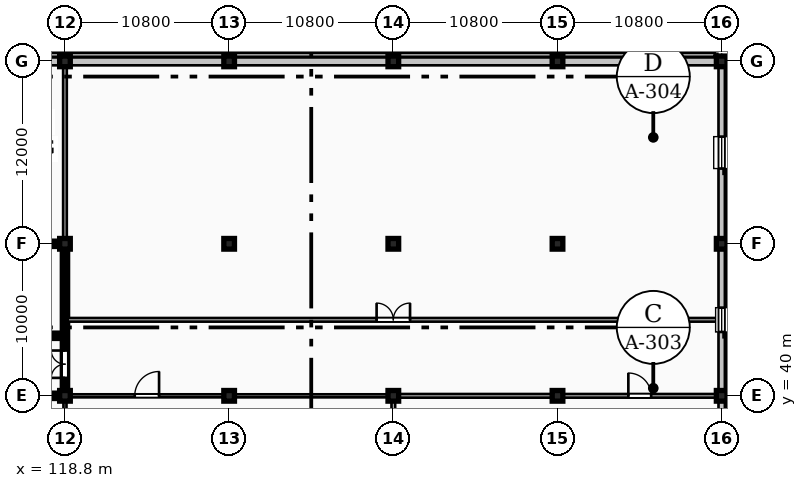
"""IFC4 building model, lengths in metres.
Left out: names, types, materials, properties, quantities, classifications, styles, units other than length and angle.
Written with IfcOpenShell. Run it as: python <this file> out.ifc"""

import sys

from ifc_helpers import new_model, si_unit, direction, frame, frame_2d, origin, origin_2d, place, context, subcontext, project, spatial, rectangle, extrude, element, fill, save


model = new_model("IFC4")
c1 = context("Model", 3, precision=1e-05, world=origin(), true_north=direction((0.0, 1.0)))
c2 = subcontext(c1, "Body", "Model", "MODEL_VIEW")
j1 = project(units=[si_unit("LENGTHUNIT", "METRE"), si_unit("PLANEANGLEUNIT", "RADIAN")], contexts=[c1])
p1 = place(None, origin())
s1 = spatial("IfcSite", under=j1, at=p1, CompositionType="ELEMENT")
p2 = place(p1, origin())
s2 = spatial("IfcBuilding", under=s1, at=p2, CompositionType="ELEMENT")
p3 = place(p2, origin())
s3 = spatial("IfcBuildingStorey", under=s2, at=p3, CompositionType="ELEMENT", Elevation=0.0)
for number, where, z_axis, x_axis in (
    (1, (118.8, 40.0, 0.0), (0.0, 0.0, 1.0), (1.0, 0.0, 0.0)),
    (2, (118.8, 50.0, 0.0), (0.0, 0.0, 1.0), (1.0, 0.0, 0.0)),
    (3, (118.8, 62.0, 0.0), (0.0, 0.0, 1.0), (1.0, 0.0, 0.0)),
    (4, (129.6, 40.0, 0.0), (0.0, 0.0, 1.0), (1.0, 0.0, 0.0)),
    (5, (129.6, 50.0, 0.0), (0.0, 0.0, 1.0), (1.0, 0.0, 0.0)),
    (6, (129.6, 62.0, 0.0), (0.0, 0.0, 1.0), (1.0, 0.0, 0.0)),
    (7, (140.4, 40.0, 0.0), (0.0, 0.0, 1.0), (1.0, 0.0, 0.0)),
    (8, (140.4, 50.0, 0.0), (0.0, 0.0, 1.0), (1.0, 0.0, 0.0)),
    (9, (140.4, 62.0, 0.0), (0.0, 0.0, 1.0), (1.0, 0.0, 0.0)),
    (10, (151.2, 40.0, 0.0), (0.0, 0.0, 1.0), (1.0, 0.0, 0.0)),
    (11, (151.2, 50.0, 0.0), (0.0, 0.0, 1.0), (1.0, 0.0, 0.0)),
    (12, (151.2, 62.0, 0.0), (0.0, 0.0, 1.0), (1.0, 0.0, 0.0)),
    (13, (162.0, 40.0, 0.0), (0.0, 0.0, 1.0), (1.0, 0.0, 0.0)),
    (14, (162.0, 50.0, 0.0), (0.0, 0.0, 1.0), (1.0, 0.0, 0.0)),
    (15, (162.0, 62.0, 0.0), (0.0, 0.0, 1.0), (1.0, 0.0, 0.0)),
):
    element("IfcColumn", number, at=place(p3, frame(where, z_axis=z_axis, x_axis=x_axis)), inside=s3, PredefinedType="COLUMN", context=c2, shape_type="SweptSolid", body=[
        extrude(rectangle(XDim=0.7, YDim=0.7, at=origin_2d()), origin(), (0.0, 0.0, 1.0), 4.8),
    ])
p4 = place(p3, frame((162.43, 38.2, -1.38), z_axis=(0.0, 0.0, 1.0), x_axis=(0.0, 1.0, 0.0)))
e16 = element("IfcWall", 16, at=p4, inside=s3, PredefinedType="PARAPET", context=c2, shape_type="SweptSolid", body=[
    extrude(rectangle(XDim=23.35, YDim=0.26, at=frame_2d((11.675, 0.0))), origin(), (0.0, 0.0, 1.0), 4.18),
])
p5 = place(p3, frame((108.35, 62.43, -1.38), z_axis=(0.0, 0.0, 1.0), x_axis=(1.0, 0.0, 0.0)))
e17 = element("IfcWall", 17, at=p5, inside=s3, PredefinedType="PARAPET", context=c2, shape_type="SweptSolid", body=[
    extrude(rectangle(XDim=53.2, YDim=0.26, at=frame_2d((26.6, 0.0))), origin(), (0.0, 0.0, 1.0), 4.58),
])
p6 = place(p3, frame((162.0, 30.145, 0.0), z_axis=(0.0, 0.0, 1.0), x_axis=(0.0, 1.0, 0.0)))
e18 = element("IfcWall", 18, at=p6, inside=s3, PredefinedType="STANDARD", context=c2, shape_type="SweptSolid", body=[
    extrude(rectangle(XDim=9.71, YDim=0.42, at=frame_2d((4.855, 0.0))), origin(), (0.0, 0.0, 1.0), 4.13),
])
p7 = place(p6, frame((4.055, 0.0, 1.2)))
e19 = element("IfcOpeningElement", 19, at=p7, cuts=e18, PredefinedType="OPENING", context=c2, shape_type="SweptSolid", body=[
    extrude(rectangle(XDim=1.6, YDim=1.8, at=frame_2d((0.8, 0.9))), frame((0.0, 0.22, 0.0), z_axis=(0.0, -1.0, 0.0), x_axis=(1.0, 0.0, 0.0)), (0.0, 0.0, 1.0), 0.44),
])
p8 = place(p3, frame((162.0, 40.145, 0.0), z_axis=(0.0, 0.0, 1.0), x_axis=(0.0, 1.0, 0.0)))
e20 = element("IfcWall", 20, at=p8, inside=s3, PredefinedType="STANDARD", context=c2, shape_type="SweptSolid", body=[
    extrude(rectangle(XDim=9.71, YDim=0.42, at=frame_2d((4.855, 0.0))), origin(), (0.0, 0.0, 1.0), 4.13),
])
p9 = place(p8, frame((4.055, 0.0, 1.2)))
e21 = element("IfcOpeningElement", 21, at=p9, cuts=e20, PredefinedType="OPENING", context=c2, shape_type="SweptSolid", body=[
    extrude(rectangle(XDim=1.6, YDim=1.8, at=frame_2d((0.8, 0.9))), frame((0.0, 0.22, 0.0), z_axis=(0.0, -1.0, 0.0), x_axis=(1.0, 0.0, 0.0)), (0.0, 0.0, 1.0), 0.44),
])
p10 = place(p3, frame((162.0, 50.145, 0.0), z_axis=(0.0, 0.0, 1.0), x_axis=(0.0, 1.0, 0.0)))
e22 = element("IfcWall", 22, at=p10, inside=s3, PredefinedType="STANDARD", context=c2, shape_type="SweptSolid", body=[
    extrude(rectangle(XDim=11.71, YDim=0.42, at=frame_2d((5.855, 0.0))), origin(), (0.0, 0.0, 1.0), 4.13),
])
p11 = place(p10, frame((4.805, 0.0, 1.2)))
e23 = element("IfcOpeningElement", 23, at=p11, cuts=e22, PredefinedType="OPENING", context=c2, shape_type="SweptSolid", body=[
    extrude(rectangle(XDim=2.1, YDim=1.6, at=frame_2d((1.05, 0.8))), frame((0.0, 0.22, 0.0), z_axis=(0.0, -1.0, 0.0), x_axis=(1.0, 0.0, 0.0)), (0.0, 0.0, 1.0), 0.44),
])
p12 = place(p3, frame((161.855, 62.0, 0.0), z_axis=(0.0, 0.0, 1.0), x_axis=(-1.0, 0.0, 0.0)))
e24 = element("IfcWall", 24, at=p12, inside=s3, PredefinedType="SOLIDWALL", context=c2, shape_type="SweptSolid", body=[
    extrude(rectangle(XDim=10.51, YDim=0.52, at=frame_2d((5.255, 0.0))), origin(), (0.0, 0.0, 1.0), 4.13),
])
p13 = place(p3, frame((151.055, 62.0, 0.0), z_axis=(0.0, 0.0, 1.0), x_axis=(-1.0, 0.0, 0.0)))
e25 = element("IfcWall", 25, at=p13, inside=s3, PredefinedType="SOLIDWALL", context=c2, shape_type="SweptSolid", body=[
    extrude(rectangle(XDim=10.51, YDim=0.52, at=frame_2d((5.255, 0.0))), origin(), (0.0, 0.0, 1.0), 3.819),
])
p14 = place(p3, frame((140.255, 62.0, 0.0), z_axis=(0.0, 0.0, 1.0), x_axis=(-1.0, 0.0, 0.0)))
e26 = element("IfcWall", 26, at=p14, inside=s3, PredefinedType="SOLIDWALL", context=c2, shape_type="SweptSolid", body=[
    extrude(rectangle(XDim=10.51, YDim=0.52, at=frame_2d((5.255, 0.0))), origin(), (0.0, 0.0, 1.0), 3.819),
])
for number, where, z_axis, x_axis in (
    (27, (129.455, 62.0, 0.0), (0.0, 0.0, 1.0), (-1.0, 0.0, 0.0)),
    (28, (118.655, 62.0, 0.0), (0.0, 0.0, 1.0), (-1.0, 0.0, 0.0)),
):
    element("IfcWall", number, at=place(p3, frame(where, z_axis=z_axis, x_axis=x_axis)), inside=s3, PredefinedType="SOLIDWALL", context=c2, shape_type="SweptSolid", body=[
        extrude(rectangle(XDim=10.51, YDim=0.52, at=frame_2d((5.255, 0.0))), origin(), (0.0, 0.0, 1.0), 3.819),
    ])
p15 = place(p3, frame((108.35, 40.0, 0.0), z_axis=(0.0, 0.0, 1.0), x_axis=(1.0, 0.0, 0.0)))
e29 = element("IfcWall", 29, at=p15, inside=s3, PredefinedType="SHEAR", context=c2, shape_type="SweptSolid", body=[
    extrude(rectangle(XDim=10.1, YDim=0.35, at=frame_2d((5.05, 0.0))), origin(), (0.0, 0.0, 1.0), 4.56),
])
p16 = place(p3, frame((108.35, 50.0, 0.0), z_axis=(0.0, 0.0, 1.0), x_axis=(1.0, 0.0, 0.0)))
e30 = element("IfcWall", 30, at=p16, inside=s3, PredefinedType="SHEAR", context=c2, shape_type="SweptSolid", body=[
    extrude(rectangle(XDim=10.1, YDim=0.35, at=frame_2d((5.05, 0.0))), origin(), (0.0, 0.0, 1.0), 4.56),
])
p17 = place(p16, frame((1.3, 0.0, 0.0)))
e31 = element("IfcOpeningElement", 31, at=p17, cuts=e30, PredefinedType="OPENING", context=c2, shape_type="SweptSolid", body=[
    extrude(rectangle(XDim=1.6, YDim=2.2, at=frame_2d((0.8, 1.1))), frame((0.0, 0.185, 0.0), z_axis=(0.0, -1.0, 0.0), x_axis=(1.0, 0.0, 0.0)), (0.0, 0.0, 1.0), 0.37),
])
p18 = place(p3, frame((118.8, 40.35, 0.0), z_axis=(0.0, 0.0, 1.0), x_axis=(0.0, 1.0, 0.0)))
e32 = element("IfcWall", 32, at=p18, inside=s3, PredefinedType="SHEAR", context=c2, shape_type="SweptSolid", body=[
    extrude(rectangle(XDim=9.3, YDim=0.35, at=frame_2d((4.65, 0.0))), origin(), (0.0, 0.0, 1.0), 4.56),
])
p19 = place(p18, frame((0.83, 0.0, 0.0)))
e33 = element("IfcOpeningElement", 33, at=p19, cuts=e32, PredefinedType="OPENING", context=c2, shape_type="SweptSolid", body=[
    extrude(rectangle(XDim=1.8, YDim=2.25, at=frame_2d((0.9, 1.125))), frame((0.0, 0.185, 0.0), z_axis=(0.0, -1.0, 0.0), x_axis=(1.0, 0.0, 0.0)), (0.0, 0.0, 1.0), 0.37),
])
p20 = place(p3, frame((113.13, 43.95, 0.0), z_axis=(0.0, 0.0, 1.0), x_axis=(1.0, 0.0, 0.0)))
e34 = element("IfcWall", 34, at=p20, inside=s3, PredefinedType="SHEAR", context=c2, shape_type="SweptSolid", body=[
    extrude(rectangle(XDim=5.49, YDim=0.35, at=frame_2d((2.745, 0.0))), origin(), (0.0, 0.0, 1.0), 4.56),
])
p21 = place(p20, frame((2.1, 0.0, 0.0)))
e35 = element("IfcOpeningElement", 35, at=p21, cuts=e34, PredefinedType="OPENING", context=c2, shape_type="SweptSolid", body=[
    extrude(rectangle(XDim=1.1, YDim=2.2, at=frame_2d((0.55, 1.1))), frame((0.0, 0.185, 0.0), z_axis=(0.0, -1.0, 0.0), x_axis=(1.0, 0.0, 0.0)), (0.0, 0.0, 1.0), 0.37),
])
p22 = place(p3, frame((118.98, 40.0, 0.0), z_axis=(0.0, 0.0, 1.0), x_axis=(1.0, 0.0, 0.0)))
e36 = element("IfcWall", 36, at=p22, inside=s3, PredefinedType="SOLIDWALL", context=c2, shape_type="SweptSolid", body=[
    extrude(rectangle(XDim=10.42, YDim=0.2, at=frame_2d((5.21, 0.0))), origin(), (0.0, 0.0, 1.0), 3.819),
])
p23 = place(p22, frame((4.41, 0.0, 0.0)))
e37 = element("IfcOpeningElement", 37, at=p23, cuts=e36, PredefinedType="OPENING", context=c2, shape_type="SweptSolid", body=[
    extrude(rectangle(XDim=1.6, YDim=2.3, at=frame_2d((0.8, 1.15))), frame((0.0, 0.11, 0.0), z_axis=(0.0, -1.0, 0.0), x_axis=(1.0, 0.0, 0.0)), (0.0, 0.0, 1.0), 0.22),
])
p24 = place(p3, frame((129.8, 40.0, 0.0), z_axis=(0.0, 0.0, 1.0), x_axis=(1.0, 0.0, 0.0)))
e38 = element("IfcWall", 38, at=p24, inside=s3, PredefinedType="SOLIDWALL", context=c2, shape_type="SweptSolid", body=[
    extrude(rectangle(XDim=10.4, YDim=0.2, at=frame_2d((5.2, 0.0))), origin(), (0.0, 0.0, 1.0), 3.819),
])
p25 = place(p3, frame((140.6, 40.0, 0.0), z_axis=(0.0, 0.0, 1.0), x_axis=(1.0, 0.0, 0.0)))
e39 = element("IfcWall", 39, at=p25, inside=s3, PredefinedType="SOLIDWALL", context=c2, shape_type="SweptSolid", body=[
    extrude(rectangle(XDim=10.4, YDim=0.24, at=frame_2d((5.2, 0.0))), origin(), (0.0, 0.0, 1.0), 3.819),
])
p26 = place(p3, frame((151.4, 40.0, 0.0), z_axis=(0.0, 0.0, 1.0), x_axis=(1.0, 0.0, 0.0)))
e40 = element("IfcWall", 40, at=p26, inside=s3, PredefinedType="SOLIDWALL", context=c2, shape_type="SweptSolid", body=[
    extrude(rectangle(XDim=10.42, YDim=0.24, at=frame_2d((5.21, 0.0))), origin(), (0.0, 0.0, 1.0), 4.13),
])
p27 = place(p26, frame((4.46, 0.0, 0.0)))
e41 = element("IfcOpeningElement", 41, at=p27, cuts=e40, PredefinedType="OPENING", context=c2, shape_type="SweptSolid", body=[
    extrude(rectangle(XDim=1.5, YDim=2.3, at=frame_2d((0.75, 1.15))), frame((0.0, 0.13, 0.0), z_axis=(0.0, -1.0, 0.0), x_axis=(1.0, 0.0, 0.0)), (0.0, 0.0, 1.0), 0.26),
])
p28 = place(p3, frame((118.98, 45.0, 0.0), z_axis=(0.0, 0.0, 1.0), x_axis=(1.0, 0.0, 0.0)))
e42 = element("IfcWall", 42, at=p28, inside=s3, PredefinedType="SOLIDWALL", context=c2, shape_type="SweptSolid", body=[
    extrude(rectangle(XDim=42.84, YDim=0.24, at=frame_2d((21.42, 0.0))), origin(), (0.0, 0.0, 1.0), 4.52),
])
p29 = place(p28, frame((20.32, 0.0, 0.0)))
e43 = element("IfcOpeningElement", 43, at=p29, cuts=e42, PredefinedType="OPENING", context=c2, shape_type="SweptSolid", body=[
    extrude(rectangle(XDim=2.2, YDim=2.6, at=frame_2d((1.1, 1.3))), frame((0.0, 0.13, 0.0), z_axis=(0.0, -1.0, 0.0), x_axis=(1.0, 0.0, 0.0)), (0.0, 0.0, 1.0), 0.26),
])
p30 = place(p3, frame((118.8, 30.2, 0.0), z_axis=(0.0, 0.0, 1.0), x_axis=(0.0, 1.0, 0.0)))
e44 = element("IfcWall", 44, at=p30, inside=s3, PredefinedType="SOLIDWALL", context=c2, shape_type="SweptSolid", body=[
    extrude(rectangle(XDim=9.62, YDim=0.2, at=frame_2d((4.81, 0.0))), origin(), (0.0, 0.0, 1.0), 3.97),
])
p31 = place(p3, frame((118.8, 50.18, 0.0), z_axis=(0.0, 0.0, 1.0), x_axis=(0.0, 1.0, 0.0)))
e45 = element("IfcWall", 45, at=p31, inside=s3, PredefinedType="SOLIDWALL", context=c2, shape_type="SweptSolid", body=[
    extrude(rectangle(XDim=11.64, YDim=0.24, at=frame_2d((5.82, 0.0))), origin(), (0.0, 0.0, 1.0), 3.919),
])
p32 = place(p3, frame((140.4, 30.2, 0.0), z_axis=(0.0, 0.0, 1.0), x_axis=(0.0, 1.0, 0.0)))
e46 = element("IfcWall", 46, at=p32, inside=s3, PredefinedType="SOLIDWALL", context=c2, shape_type="SweptSolid", body=[
    extrude(rectangle(XDim=9.62, YDim=0.24, at=frame_2d((4.81, 0.0))), origin(), (0.0, 0.0, 1.0), 3.97),
])
p33 = place(p9, origin())
e47 = element("IfcWindow", 47, at=p33, inside=s3, PartitioningType="SINGLE_PANEL", PredefinedType="WINDOW", context=c2, shape_type="SweptSolid", body=[
    extrude(rectangle(XDim=1.6, YDim=1.8, at=frame_2d((0.8, 0.9))), frame((0.0, 0.03, 0.0), z_axis=(0.0, -1.0, 0.0), x_axis=(1.0, 0.0, 0.0)), (0.0, 0.0, 1.0), 0.06),
])
fill(e21, e47)
p34 = place(p11, origin())
e48 = element("IfcWindow", 48, at=p34, inside=s3, PartitioningType="SINGLE_PANEL", PredefinedType="WINDOW", context=c2, shape_type="SweptSolid", body=[
    extrude(rectangle(XDim=2.1, YDim=1.6, at=frame_2d((1.05, 0.8))), frame((0.0, 0.03, 0.0), z_axis=(0.0, -1.0, 0.0), x_axis=(1.0, 0.0, 0.0)), (0.0, 0.0, 1.0), 0.06),
])
fill(e23, e48)
p35 = place(p19, origin())
e49 = element("IfcDoor", 49, at=p35, inside=s3, OperationType="DOUBLE_DOOR_SINGLE_SWING", PredefinedType="DOOR", context=c2, shape_type="SweptSolid", body=[
    extrude(rectangle(XDim=1.8, YDim=2.25, at=frame_2d((0.9, 1.125))), frame((0.0, 0.025, 0.0), z_axis=(0.0, -1.0, 0.0), x_axis=(1.0, 0.0, 0.0)), (0.0, 0.0, 1.0), 0.05),
])
fill(e33, e49)
p36 = place(p23, origin())
e50 = element("IfcDoor", 50, at=p36, inside=s3, OperationType="SINGLE_SWING_RIGHT", PredefinedType="DOOR", context=c2, shape_type="SweptSolid", body=[
    extrude(rectangle(XDim=1.6, YDim=2.3, at=frame_2d((0.8, 1.15))), frame((0.0, 0.025, 0.0), z_axis=(0.0, -1.0, 0.0), x_axis=(1.0, 0.0, 0.0)), (0.0, 0.0, 1.0), 0.05),
])
fill(e37, e50)
p37 = place(p27, origin())
e51 = element("IfcDoor", 51, at=p37, inside=s3, OperationType="SINGLE_SWING_LEFT", PredefinedType="DOOR", context=c2, shape_type="SweptSolid", body=[
    extrude(rectangle(XDim=1.5, YDim=2.3, at=frame_2d((0.75, 1.15))), frame((0.0, 0.025, 0.0), z_axis=(0.0, -1.0, 0.0), x_axis=(1.0, 0.0, 0.0)), (0.0, 0.0, 1.0), 0.05),
])
fill(e41, e51)
p38 = place(p29, origin())
e52 = element("IfcDoor", 52, at=p38, inside=s3, OperationType="DOUBLE_DOOR_SINGLE_SWING", PredefinedType="DOOR", context=c2, shape_type="SweptSolid", body=[
    extrude(rectangle(XDim=2.2, YDim=2.6, at=frame_2d((1.1, 1.3))), frame((0.0, 0.025, 0.0), z_axis=(0.0, -1.0, 0.0), x_axis=(1.0, 0.0, 0.0)), (0.0, 0.0, 1.0), 0.05),
])
fill(e43, e52)
save(model, sys.argv[1])
